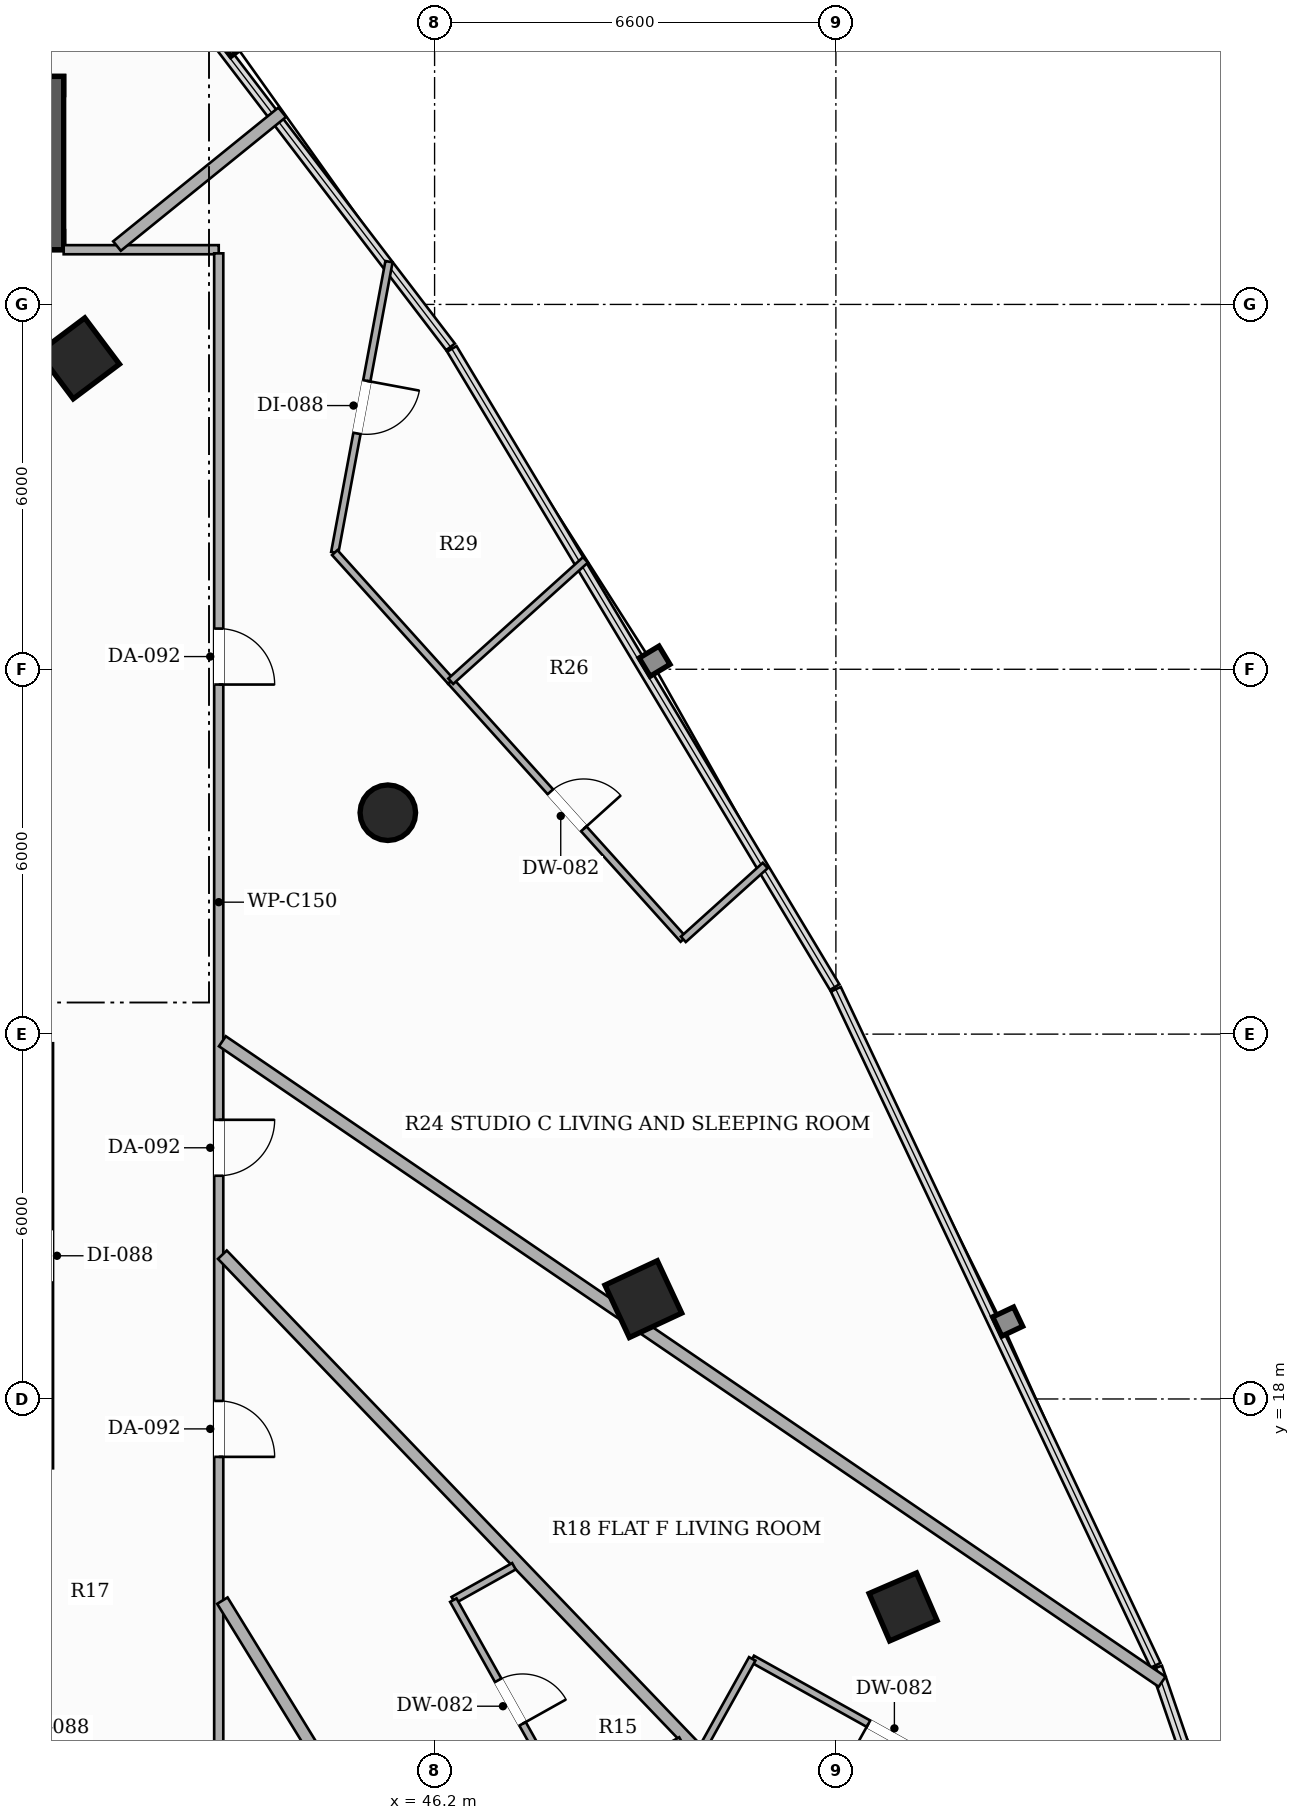
"""IFC4 building model, lengths in metres.
Left out: names, types, materials, properties, quantities, classifications, styles, units other than length and angle.
Written with IfcOpenShell. Run it as: python <this file> out.ifc"""

import sys

from ifc_helpers import new_model, si_unit, direction, frame, frame_2d, origin, origin_2d, place, context, subcontext, project, spatial, rectangle, hollow_rectangle, hollow_circle, extrude, element, fill, save


model = new_model("IFC4")
c1 = context("Model", 3, precision=1e-05, world=origin(), true_north=direction((0.0, 1.0)))
c2 = subcontext(c1, "Body", "Model", "MODEL_VIEW")
j1 = project(units=[si_unit("LENGTHUNIT", "METRE"), si_unit("PLANEANGLEUNIT", "RADIAN")], contexts=[c1])
p1 = place(None, origin())
s1 = spatial("IfcSite", under=j1, at=p1, CompositionType="ELEMENT")
p2 = place(p1, origin())
s2 = spatial("IfcBuilding", under=s1, at=p2, CompositionType="ELEMENT")
p3 = place(p2, frame((0.0, 0.0, 80.75)))
s3 = spatial("IfcBuildingStorey", under=s2, at=p3, CompositionType="ELEMENT", Elevation=80.75)
p4 = place(p3, frame((40.1, 37.05, 0.0), z_axis=(0.0, 0.0, 1.0), x_axis=(-1.0, 0.0, 0.0)))
e1 = element("IfcWall", 1, at=p4, inside=s3, PredefinedType="SHEAR", context=c2, shape_type="SweptSolid", body=[
    extrude(rectangle(XDim=14.2, YDim=0.3, at=frame_2d((7.1, 0.0))), origin(), (0.0, 0.0, 1.0), 3.3),
])
p5 = place(p4, frame((12.325, 0.0, 0.0)))
e2 = element("IfcOpeningElement", 2, at=p5, cuts=e1, PredefinedType="OPENING", context=c2, shape_type="SweptSolid", body=[
    extrude(rectangle(XDim=1.1, YDim=2.2, at=frame_2d((0.55, 1.1))), frame((0.0, 0.16, 0.0), z_axis=(0.0, -1.0, 0.0), x_axis=(1.0, 0.0, 0.0)), (0.0, 0.0, 1.0), 0.32),
])
p6 = place(p4, frame((0.775, 0.0, 0.0)))
e3 = element("IfcOpeningElement", 3, at=p6, cuts=e1, PredefinedType="OPENING", context=c2, shape_type="SweptSolid", body=[
    extrude(rectangle(XDim=1.1, YDim=2.2, at=frame_2d((0.55, 1.1))), frame((0.0, 0.16, 0.0), z_axis=(0.0, -1.0, 0.0), x_axis=(1.0, 0.0, 0.0)), (0.0, 0.0, 1.0), 0.32),
])
p7 = place(p3, frame((25.9, 39.6, 0.0), z_axis=(0.0, 0.0, 1.0), x_axis=(1.0, 0.0, 0.0)))
e4 = element("IfcWall", 4, at=p7, inside=s3, PredefinedType="SHEAR", context=c2, shape_type="SweptSolid", body=[
    extrude(rectangle(XDim=14.2, YDim=0.3, at=frame_2d((7.1, 0.0))), origin(), (0.0, 0.0, 1.0), 3.3),
])
p8 = place(p3, frame((39.95, 36.9, 0.0), z_axis=(0.0, 0.0, 1.0), x_axis=(0.0, 1.0, 0.0)))
e5 = element("IfcWall", 5, at=p8, inside=s3, PredefinedType="SHEAR", context=c2, shape_type="SweptSolid", body=[
    extrude(rectangle(XDim=2.85, YDim=0.3, at=frame_2d((1.425, 0.0))), origin(), (0.0, 0.0, 1.0), 3.3),
])
p9 = place(p3, frame((49.633, 19.642, 0.0), z_axis=(0.0, 0.0, 1.0), x_axis=(-0.422618261741, 0.906307787037, 0.0)))
e6 = element("IfcColumn", 6, at=p9, inside=s3, PredefinedType="COLUMN", context=c2, shape_type="SweptSolid", body=[
    extrude(hollow_rectangle(XDim=0.95, YDim=0.95, WallThickness=0.032, at=origin_2d()), origin(), (0.0, 0.0, 1.0), 3.3),
])
p10 = place(p3, frame((45.431, 27.641, 0.0), z_axis=(0.0, 0.0, 1.0), x_axis=(1.0, 0.0, 0.0)))
e7 = element("IfcColumn", 7, at=p10, inside=s3, PredefinedType="COLUMN", context=c2, shape_type="SweptSolid", body=[
    extrude(hollow_circle(Radius=0.457, WallThickness=0.025, at=origin_2d()), origin(), (0.0, 0.0, 1.0), 3.3),
])
p11 = place(p3, frame((40.352, 35.113, 0.0), z_axis=(0.0, 0.0, 1.0), x_axis=(-0.600420225326, 0.799684658487, 0.0)))
e8 = element("IfcColumn", 8, at=p11, inside=s3, PredefinedType="COLUMN", context=c2, shape_type="SweptSolid", body=[
    extrude(hollow_rectangle(XDim=0.95, YDim=0.95, WallThickness=0.032, at=origin_2d()), origin(), (0.0, 0.0, 1.0), 3.3),
])
p12 = place(p3, frame((53.905, 14.58, 0.0), z_axis=(0.0, 0.0, 1.0), x_axis=(-0.397147890635, 0.917754625684, 0.0)))
e9 = element("IfcColumn", 9, at=p12, inside=s3, PredefinedType="COLUMN", context=c2, shape_type="SweptSolid", body=[
    extrude(hollow_rectangle(XDim=0.85, YDim=0.85, WallThickness=0.028, at=origin_2d()), origin(), (0.0, 0.0, 1.0), 3.3),
])
p13 = place(p3, frame((40.1, 36.9, 0.0), z_axis=(0.0, 0.0, 1.0), x_axis=(1.0, 0.0, 0.0)))
e10 = element("IfcWall", 10, at=p13, inside=s3, PredefinedType="PARTITIONING", context=c2, shape_type="SweptSolid", body=[
    extrude(rectangle(XDim=2.55, YDim=0.15, at=frame_2d((1.275, 0.0))), origin(), (0.0, 0.0, 1.0), 2.413),
])
p14 = place(p3, frame((42.65, 36.84, 0.0), z_axis=(0.0, 0.0, 1.0), x_axis=(0.0, -1.0, 0.0)))
e11 = element("IfcWall", 11, at=p14, inside=s3, PredefinedType="PARTITIONING", context=c2, shape_type="SweptSolid", body=[
    extrude(rectangle(XDim=25.04, YDim=0.15, at=frame_2d((12.52, 0.0))), origin(), (0.0, 0.0, 1.0), 2.413),
])
p15 = place(p14, frame((6.171, 0.0, 0.0)))
e12 = element("IfcOpeningElement", 12, at=p15, cuts=e11, PredefinedType="OPENING", context=c2, shape_type="SweptSolid", body=[
    extrude(rectangle(XDim=0.92, YDim=2.15, at=frame_2d((0.46, 1.075))), frame((0.0, 0.085, 0.0), z_axis=(0.0, -1.0, 0.0), x_axis=(1.0, 0.0, 0.0)), (0.0, 0.0, 1.0), 0.17),
])
p16 = place(p14, frame((14.249, 0.0, 0.0)))
e13 = element("IfcOpeningElement", 13, at=p16, cuts=e11, PredefinedType="OPENING", context=c2, shape_type="SweptSolid", body=[
    extrude(rectangle(XDim=0.92, YDim=2.15, at=frame_2d((0.46, 1.075))), frame((0.0, 0.085, 0.0), z_axis=(0.0, -1.0, 0.0), x_axis=(1.0, 0.0, 0.0)), (0.0, 0.0, 1.0), 0.17),
])
p17 = place(p14, frame((18.872, 0.0, 0.0)))
e14 = element("IfcOpeningElement", 14, at=p17, cuts=e11, PredefinedType="OPENING", context=c2, shape_type="SweptSolid", body=[
    extrude(rectangle(XDim=0.92, YDim=2.15, at=frame_2d((0.46, 1.075))), frame((0.0, 0.085, 0.0), z_axis=(0.0, -1.0, 0.0), x_axis=(1.0, 0.0, 0.0)), (0.0, 0.0, 1.0), 0.17),
])
p18 = place(p3, frame((39.85, 16.86, 0.0), z_axis=(0.0, 0.0, 1.0), x_axis=(0.0, 1.0, 0.0)))
e15 = element("IfcWall", 15, at=p18, inside=s3, PredefinedType="PARTITIONING", context=c2, shape_type="SweptSolid", body=[
    extrude(rectangle(XDim=6.99, YDim=0.15, at=frame_2d((3.495, 0.0))), origin(), (0.0, 0.0, 1.0), 2.669),
])
p19 = place(p18, frame((3.055, 0.0, 0.0)))
e16 = element("IfcOpeningElement", 16, at=p19, cuts=e15, PredefinedType="OPENING", context=c2, shape_type="SweptSolid", body=[
    extrude(rectangle(XDim=0.88, YDim=2.1, at=frame_2d((0.44, 1.05))), frame((0.0, 0.085, 0.0), z_axis=(0.0, -1.0, 0.0), x_axis=(1.0, 0.0, 0.0)), (0.0, 0.0, 1.0), 0.17),
])
p20 = place(p3, frame((43.694, 39.16, 0.0), z_axis=(0.0, 0.0, 1.0), x_axis=(-0.777183068613, -0.629274564765, 0.0)))
e17 = element("IfcWall", 17, at=p20, inside=s3, PredefinedType="PARTITIONING", context=c2, shape_type="SweptSolid", body=[
    extrude(rectangle(XDim=3.496, YDim=0.2, at=frame_2d((1.748, 0.0))), origin(), (0.0, 0.0, 1.0), 3.06),
])
p21 = place(p3, frame((58.165, 13.35, 0.0), z_axis=(0.0, 0.0, 1.0), x_axis=(-0.826341659386, 0.563169123766, 0.0)))
e18 = element("IfcWall", 18, at=p21, inside=s3, PredefinedType="PARTITIONING", context=c2, shape_type="SweptSolid", body=[
    extrude(rectangle(XDim=18.703, YDim=0.2, at=frame_2d((9.352, 0.0))), origin(), (0.0, 0.0, 1.0), 2.413),
])
p22 = place(p3, frame((58.237, 4.179, 0.0), z_axis=(0.0, 0.0, 1.0), x_axis=(-0.69208567792, 0.721815360337, 0.0)))
e19 = element("IfcWall", 19, at=p22, inside=s3, PredefinedType="PARTITIONING", context=c2, shape_type="SweptSolid", body=[
    extrude(rectangle(XDim=22.435, YDim=0.2, at=frame_2d((11.218, 0.0))), origin(), (0.0, 0.0, 1.0), 2.413),
])
p23 = place(p3, frame((49.827, 3.09, 0.0), z_axis=(0.0, 0.0, 1.0), x_axis=(-0.523146880199, 0.852242536921, 0.0)))
e20 = element("IfcWall", 20, at=p23, inside=s3, PredefinedType="PARTITIONING", context=c2, shape_type="SweptSolid", body=[
    extrude(rectangle(XDim=13.604, YDim=0.2, at=frame_2d((6.802, 0.0))), origin(), (0.0, 0.0, 1.0), 2.413),
])
p24 = place(p3, frame((46.466, 29.803, 0.0), z_axis=(0.0, 0.0, 1.0), x_axis=(0.669491047861, -0.742820124144, 0.0)))
e21 = element("IfcWall", 21, at=p24, inside=s3, PredefinedType="PARTITIONING", context=c2, shape_type="SweptSolid", body=[
    extrude(rectangle(XDim=5.713, YDim=0.12, at=frame_2d((2.856, 0.0))), origin(), (0.0, 0.0, 1.0), 3.06),
])
p25 = place(p24, frame((2.447, 0.0, 0.0)))
e22 = element("IfcOpeningElement", 22, at=p25, cuts=e21, PredefinedType="OPENING", context=c2, shape_type="SweptSolid", body=[
    extrude(rectangle(XDim=0.82, YDim=2.1, at=frame_2d((0.41, 1.05))), frame((0.0, 0.07, 0.0), z_axis=(0.0, -1.0, 0.0), x_axis=(1.0, 0.0, 0.0)), (0.0, 0.0, 1.0), 0.14),
])
p26 = place(p3, frame((50.291, 25.559, 0.0), z_axis=(0.0, 0.0, 1.0), x_axis=(0.742845405041, 0.669462996894, 0.0)))
e23 = element("IfcWall", 23, at=p26, inside=s3, PredefinedType="PARTITIONING", context=c2, shape_type="SweptSolid", body=[
    extrude(rectangle(XDim=1.813, YDim=0.12, at=frame_2d((0.907, 0.0))), origin(), (0.0, 0.0, 1.0), 3.06),
])
p27 = place(p3, frame((45.45, 36.703, 0.0), z_axis=(0.0, 0.0, 1.0), x_axis=(-0.183267636936, -0.9830630566, 0.0)))
e24 = element("IfcWall", 24, at=p27, inside=s3, PredefinedType="PARTITIONING", context=c2, shape_type="SweptSolid", body=[
    extrude(rectangle(XDim=4.866, YDim=0.12, at=frame_2d((2.433, 0.0))), origin(), (0.0, 0.0, 1.0), 2.619),
])
p28 = place(p27, frame((1.993, 0.0, 0.0)))
e25 = element("IfcOpeningElement", 25, at=p28, cuts=e24, PredefinedType="OPENING", context=c2, shape_type="SweptSolid", body=[
    extrude(rectangle(XDim=0.88, YDim=2.1, at=frame_2d((0.44, 1.05))), frame((0.0, 0.07, 0.0), z_axis=(0.0, -1.0, 0.0), x_axis=(1.0, 0.0, 0.0)), (0.0, 0.0, 1.0), 0.14),
])
p29 = place(p3, frame((44.558, 31.919, 0.0), z_axis=(0.0, 0.0, 1.0), x_axis=(0.669660366513, -0.742667485165, 0.0)))
e26 = element("IfcWall", 26, at=p29, inside=s3, PredefinedType="PARTITIONING", context=c2, shape_type="SweptSolid", body=[
    extrude(rectangle(XDim=2.849, YDim=0.12, at=frame_2d((1.425, 0.0))), origin(), (0.0, 0.0, 1.0), 3.06),
])
p30 = place(p3, frame((46.466, 29.803, 0.0), z_axis=(0.0, 0.0, 1.0), x_axis=(0.742837964983, 0.669471252392, 0.0)))
e27 = element("IfcWall", 27, at=p30, inside=s3, PredefinedType="PARTITIONING", context=c2, shape_type="SweptSolid", body=[
    extrude(rectangle(XDim=2.982, YDim=0.12, at=frame_2d((1.491, 0.0))), origin(), (0.0, 0.0, 1.0), 3.06),
])
p31 = place(p3, frame((54.847, 11.818, 0.0), z_axis=(0.0, 0.0, 1.0), x_axis=(-0.87346578699, 0.486885529624, 0.0)))
e28 = element("IfcWall", 28, at=p31, inside=s3, PredefinedType="PARTITIONING", context=c2, shape_type="SweptSolid", body=[
    extrude(rectangle(XDim=3.919, YDim=0.12, at=frame_2d((1.959, 0.0))), origin(), (0.0, 0.0, 1.0), 2.413),
])
p32 = place(p31, frame((0.91, 0.0, 0.0)))
e29 = element("IfcOpeningElement", 29, at=p32, cuts=e28, PredefinedType="OPENING", context=c2, shape_type="SweptSolid", body=[
    extrude(rectangle(XDim=0.82, YDim=2.1, at=frame_2d((0.41, 1.05))), frame((0.0, 0.07, 0.0), z_axis=(0.0, -1.0, 0.0), x_axis=(1.0, 0.0, 0.0)), (0.0, 0.0, 1.0), 0.14),
])
p33 = place(p3, frame((51.424, 13.726, 0.0), z_axis=(0.0, 0.0, 1.0), x_axis=(-0.486605473044, -0.873621836726, 0.0)))
e30 = element("IfcWall", 30, at=p33, inside=s3, PredefinedType="PARTITIONING", context=c2, shape_type="SweptSolid", body=[
    extrude(rectangle(XDim=1.679, YDim=0.12, at=frame_2d((0.84, 0.0))), origin(), (0.0, 0.0, 1.0), 2.413),
])
p34 = place(p3, frame((47.505, 15.249, 0.0), z_axis=(0.0, 0.0, 1.0), x_axis=(-0.872914025969, -0.487874064967, 0.0)))
e31 = element("IfcWall", 31, at=p34, inside=s3, PredefinedType="PARTITIONING", context=c2, shape_type="SweptSolid", body=[
    extrude(rectangle(XDim=1.142, YDim=0.12, at=frame_2d((0.571, 0.0))), origin(), (0.0, 0.0, 1.0), 3.06),
])
p35 = place(p3, frame((46.508, 14.692, 0.0), z_axis=(0.0, 0.0, 1.0), x_axis=(0.488483407483, -0.872573183529, 0.0)))
e32 = element("IfcWall", 32, at=p35, inside=s3, PredefinedType="PARTITIONING", context=c2, shape_type="SweptSolid", body=[
    extrude(rectangle(XDim=3.843, YDim=0.12, at=frame_2d((1.921, 0.0))), origin(), (0.0, 0.0, 1.0), 3.06),
])
p36 = place(p35, frame((1.511, 0.0, 0.0)))
e33 = element("IfcOpeningElement", 33, at=p36, cuts=e32, PredefinedType="OPENING", context=c2, shape_type="SweptSolid", body=[
    extrude(rectangle(XDim=0.82, YDim=2.1, at=frame_2d((0.41, 1.05))), frame((0.0, 0.07, 0.0), z_axis=(0.0, -1.0, 0.0), x_axis=(1.0, 0.0, 0.0)), (0.0, 0.0, 1.0), 0.14),
])
p37 = place(p3, frame((48.385, 11.339, 0.0), z_axis=(0.0, 0.0, 1.0), x_axis=(0.872618854318, 0.488401817246, 0.0)))
e34 = element("IfcWall", 34, at=p37, inside=s3, PredefinedType="PARTITIONING", context=c2, shape_type="SweptSolid", body=[
    extrude(rectangle(XDim=2.139, YDim=0.12, at=frame_2d((1.07, 0.0))), origin(), (0.0, 0.0, 1.0), 2.413),
])
p38 = place(p15, origin())
e35 = element("IfcDoor", 35, at=p38, inside=s3, OperationType="SINGLE_SWING_RIGHT", PredefinedType="DOOR", context=c2, shape_type="SweptSolid", body=[
    extrude(rectangle(XDim=0.92, YDim=2.15, at=frame_2d((0.46, 1.075))), frame((0.0, 0.025, 0.0), z_axis=(0.0, -1.0, 0.0), x_axis=(1.0, 0.0, 0.0)), (0.0, 0.0, 1.0), 0.05),
])
fill(e12, e35)
p39 = place(p25, origin())
e36 = element("IfcDoor", 36, at=p39, inside=s3, OperationType="SINGLE_SWING_RIGHT", PredefinedType="DOOR", context=c2, shape_type="SweptSolid", body=[
    extrude(rectangle(XDim=0.82, YDim=2.1, at=frame_2d((0.41, 1.05))), frame((0.0, 0.025, 0.0), z_axis=(0.0, -1.0, 0.0), x_axis=(1.0, 0.0, 0.0)), (0.0, 0.0, 1.0), 0.05),
])
fill(e22, e36)
p40 = place(p28, origin())
e37 = element("IfcDoor", 37, at=p40, inside=s3, OperationType="SINGLE_SWING_LEFT", PredefinedType="DOOR", context=c2, shape_type="SweptSolid", body=[
    extrude(rectangle(XDim=0.88, YDim=2.1, at=frame_2d((0.44, 1.05))), frame((0.0, 0.025, 0.0), z_axis=(0.0, -1.0, 0.0), x_axis=(1.0, 0.0, 0.0)), (0.0, 0.0, 1.0), 0.05),
])
fill(e25, e37)
p41 = place(p16, origin())
e38 = element("IfcDoor", 38, at=p41, inside=s3, OperationType="SINGLE_SWING_LEFT", PredefinedType="DOOR", context=c2, shape_type="SweptSolid", body=[
    extrude(rectangle(XDim=0.92, YDim=2.15, at=frame_2d((0.46, 1.075))), frame((0.0, 0.025, 0.0), z_axis=(0.0, -1.0, 0.0), x_axis=(1.0, 0.0, 0.0)), (0.0, 0.0, 1.0), 0.05),
])
fill(e13, e38)
p42 = place(p32, origin())
e39 = element("IfcDoor", 39, at=p42, inside=s3, OperationType="SINGLE_SWING_RIGHT", PredefinedType="DOOR", context=c2, shape_type="SweptSolid", body=[
    extrude(rectangle(XDim=0.82, YDim=2.1, at=frame_2d((0.41, 1.05))), frame((0.0, 0.025, 0.0), z_axis=(0.0, -1.0, 0.0), x_axis=(1.0, 0.0, 0.0)), (0.0, 0.0, 1.0), 0.05),
])
fill(e29, e39)
p43 = place(p17, origin())
e40 = element("IfcDoor", 40, at=p43, inside=s3, OperationType="SINGLE_SWING_RIGHT", PredefinedType="DOOR", context=c2, shape_type="SweptSolid", body=[
    extrude(rectangle(XDim=0.92, YDim=2.15, at=frame_2d((0.46, 1.075))), frame((0.0, 0.025, 0.0), z_axis=(0.0, -1.0, 0.0), x_axis=(1.0, 0.0, 0.0)), (0.0, 0.0, 1.0), 0.05),
])
fill(e14, e40)
p44 = place(p36, origin())
e41 = element("IfcDoor", 41, at=p44, inside=s3, OperationType="SINGLE_SWING_RIGHT", PredefinedType="DOOR", context=c2, shape_type="SweptSolid", body=[
    extrude(rectangle(XDim=0.82, YDim=2.1, at=frame_2d((0.41, 1.05))), frame((0.0, 0.025, 0.0), z_axis=(0.0, -1.0, 0.0), x_axis=(1.0, 0.0, 0.0)), (0.0, 0.0, 1.0), 0.05),
])
fill(e33, e41)
save(model, sys.argv[1])
